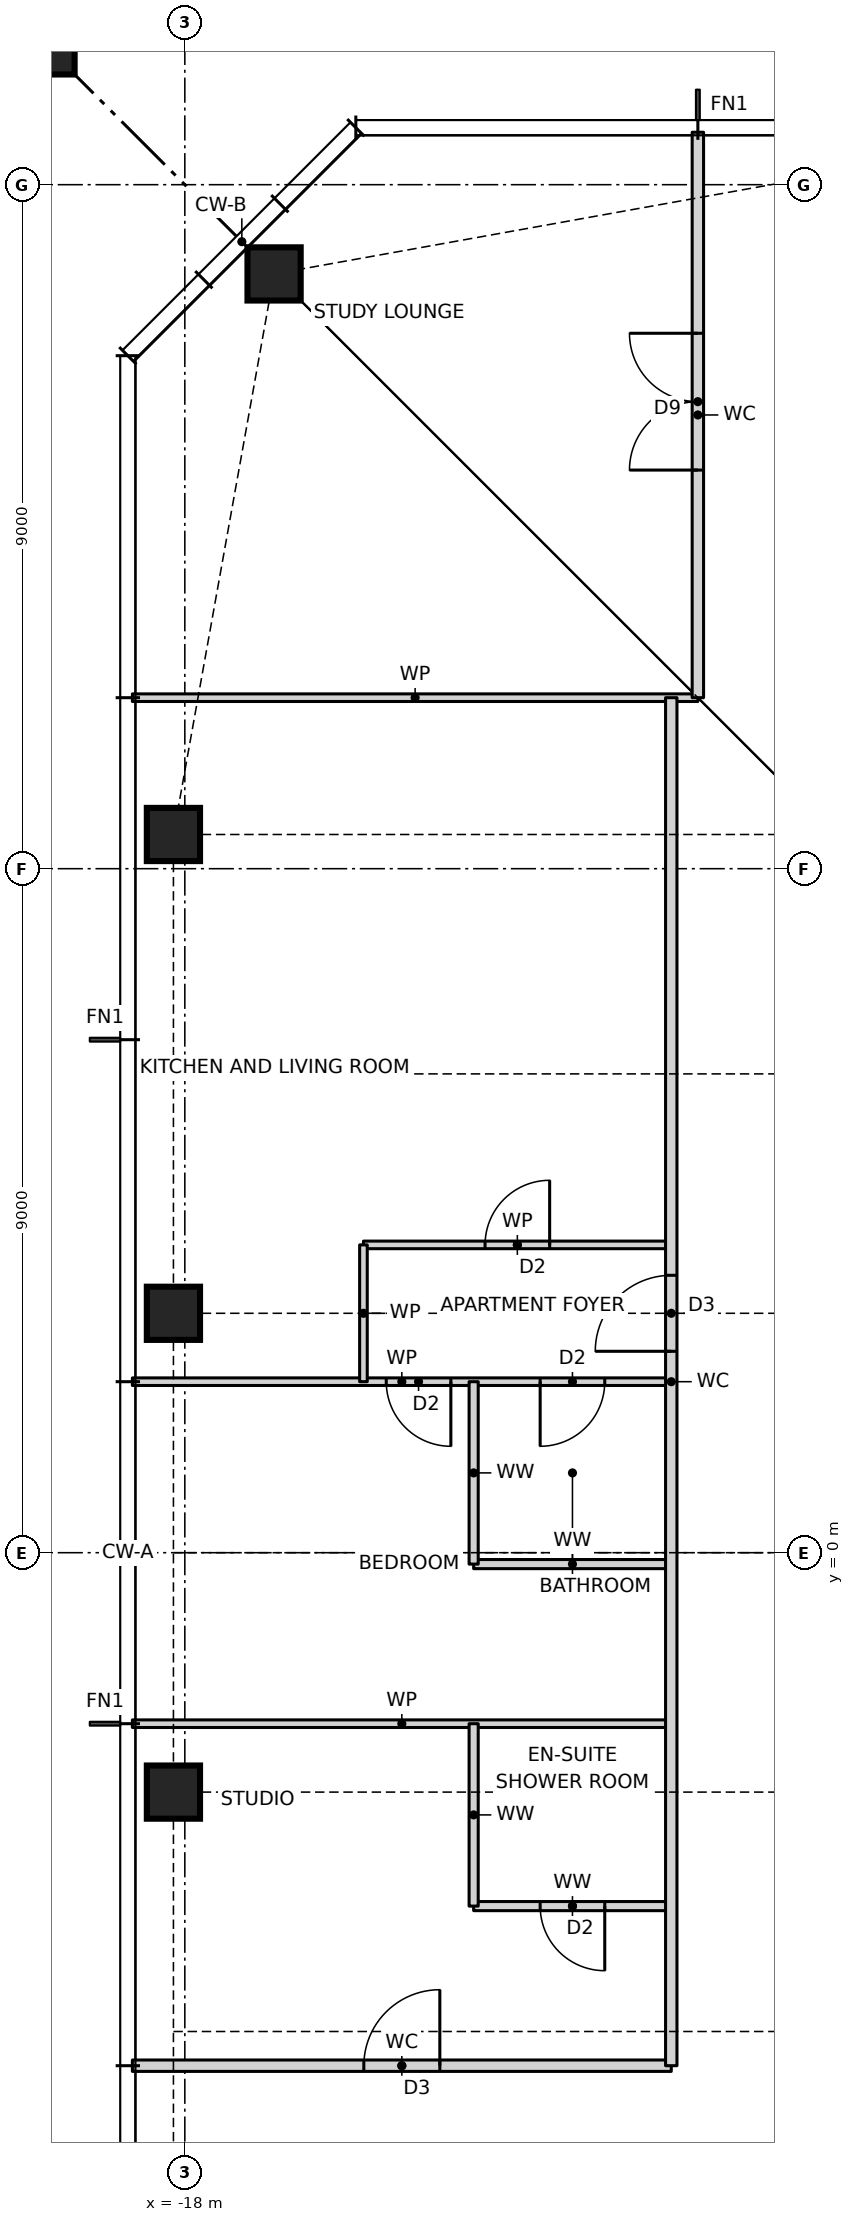
"""IFC4 building model, lengths in metres.
Left out: names, types, materials, properties, quantities, classifications, styles, units other than length and angle.
Written with IfcOpenShell. Run it as: python <this file> out.ifc"""

import sys

from ifc_helpers import new_model, si_unit, direction, frame, frame_2d, origin, origin_2d, place, context, subcontext, project, spatial, rectangle, hollow_rectangle, i_section, extrude, element, fill, save


model = new_model("IFC4")
c1 = context("Model", 3, precision=1e-05, world=origin(), true_north=direction((0.0, 1.0)))
c2 = subcontext(c1, "Body", "Model", "MODEL_VIEW")
j1 = project(units=[si_unit("LENGTHUNIT", "METRE"), si_unit("PLANEANGLEUNIT", "RADIAN")], contexts=[c1])
p1 = place(None, origin())
s1 = spatial("IfcSite", under=j1, at=p1, CompositionType="ELEMENT")
p2 = place(p1, origin())
s2 = spatial("IfcBuilding", under=s1, at=p2, CompositionType="ELEMENT")
p3 = place(p2, frame((0.0, 0.0, 170.5)))
s3 = spatial("IfcBuildingStorey", under=s2, at=p3, CompositionType="ELEMENT", Elevation=170.5)
for number, where, z_axis, x_axis in (
    (1, (-16.826, 16.826, 0.0), (0.0, 0.0, 1.0), (1.0, 0.0, 0.0)),
    (2, (-18.15, 9.45, 0.0), (0.0, 0.0, 1.0), (1.0, 0.0, 0.0)),
    (3, (-18.15, 3.15, 0.0), (0.0, 0.0, 1.0), (1.0, 0.0, 0.0)),
    (4, (-18.15, -3.15, 0.0), (0.0, 0.0, 1.0), (1.0, 0.0, 0.0)),
):
    element("IfcColumn", number, at=place(p3, frame(where, z_axis=z_axis, x_axis=x_axis)), inside=s3, PredefinedType="COLUMN", context=c2, shape_type="SweptSolid", body=[
        extrude(hollow_rectangle(XDim=0.7, YDim=0.7, WallThickness=0.06, at=origin_2d()), origin(), (0.0, 0.0, 1.0), 3.5),
    ])
p4 = place(p3, frame((-21.65, 21.65, 0.0), z_axis=(0.0, 0.0, 1.0), x_axis=(1.0, 0.0, 0.0)))
e5 = element("IfcColumn", 5, at=p4, inside=s3, PredefinedType="COLUMN", context=c2, shape_type="SweptSolid", body=[
    extrude(rectangle(XDim=4.4, YDim=4.4, at=origin_2d()), origin(), (0.0, 0.0, 1.0), 3.5),
    extrude(i_section(OverallWidth=0.478, OverallDepth=0.599, WebThickness=0.1, FlangeThickness=0.14, at=origin_2d()), origin(), (0.0, 0.0, 1.0), 3.5),
])
p5 = place(p3, frame((-18.69, -6.75, 0.0), z_axis=(0.0, 0.0, 1.0), x_axis=(1.0, 0.0, 0.0)))
e6 = element("IfcWall", 6, at=p5, inside=s3, PredefinedType="PARTITIONING", context=c2, shape_type="SweptSolid", body=[
    extrude(rectangle(XDim=7.09, YDim=0.15, at=frame_2d((3.545, 0.0))), origin(), (0.0, 0.0, 1.0), 3.27),
])
p6 = place(p5, frame((3.045, 0.0, 0.0)))
e7 = element("IfcOpeningElement", 7, at=p6, cuts=e6, PredefinedType="OPENING", context=c2, shape_type="SweptSolid", body=[
    extrude(rectangle(XDim=1.0, YDim=2.1, at=frame_2d((0.5, 1.05))), frame((0.0, 0.085, 0.0), z_axis=(0.0, -1.0, 0.0), x_axis=(1.0, 0.0, 0.0)), (0.0, 0.0, 1.0), 0.17),
])
p7 = place(p3, frame((-14.2, -4.65, 0.0), z_axis=(0.0, 0.0, 1.0), x_axis=(1.0, 0.0, 0.0)))
e8 = element("IfcWall", 8, at=p7, inside=s3, PredefinedType="PARTITIONING", context=c2, shape_type="SweptSolid", body=[
    extrude(rectangle(XDim=2.6, YDim=0.12, at=frame_2d((1.3, 0.0))), origin(), (0.0, 0.0, 1.0), 3.27),
])
p8 = place(p7, frame((0.875, 0.0, 0.0)))
e9 = element("IfcOpeningElement", 9, at=p8, cuts=e8, PredefinedType="OPENING", context=c2, shape_type="SweptSolid", body=[
    extrude(rectangle(XDim=0.85, YDim=2.1, at=frame_2d((0.425, 1.05))), frame((0.0, 0.07, 0.0), z_axis=(0.0, -1.0, 0.0), x_axis=(1.0, 0.0, 0.0)), (0.0, 0.0, 1.0), 0.14),
])
p9 = place(p3, frame((-18.69, -2.25, 0.0), z_axis=(0.0, 0.0, 1.0), x_axis=(1.0, 0.0, 0.0)))
e10 = element("IfcWall", 10, at=p9, inside=s3, PredefinedType="PARTITIONING", context=c2, shape_type="SweptSolid", body=[
    extrude(rectangle(XDim=7.09, YDim=0.1, at=frame_2d((3.545, 0.0))), origin(), (0.0, 0.0, 1.0), 3.27),
])
p10 = place(p3, frame((-14.2, -0.15, 0.0), z_axis=(0.0, 0.0, 1.0), x_axis=(1.0, 0.0, 0.0)))
e11 = element("IfcWall", 11, at=p10, inside=s3, PredefinedType="PARTITIONING", context=c2, shape_type="SweptSolid", body=[
    extrude(rectangle(XDim=2.6, YDim=0.12, at=frame_2d((1.3, 0.0))), origin(), (0.0, 0.0, 1.0), 3.27),
])
p11 = place(p3, frame((-18.69, 2.25, 0.0), z_axis=(0.0, 0.0, 1.0), x_axis=(1.0, 0.0, 0.0)))
e12 = element("IfcWall", 12, at=p11, inside=s3, PredefinedType="PARTITIONING", context=c2, shape_type="SweptSolid", body=[
    extrude(rectangle(XDim=7.09, YDim=0.1, at=frame_2d((3.545, 0.0))), origin(), (0.0, 0.0, 1.0), 3.27),
])
p12 = place(p11, frame((3.34, 0.0, 0.0)))
e13 = element("IfcOpeningElement", 13, at=p12, cuts=e12, PredefinedType="OPENING", context=c2, shape_type="SweptSolid", body=[
    extrude(rectangle(XDim=0.85, YDim=2.1, at=frame_2d((0.425, 1.05))), frame((0.0, 0.06, 0.0), z_axis=(0.0, -1.0, 0.0), x_axis=(1.0, 0.0, 0.0)), (0.0, 0.0, 1.0), 0.12),
])
p13 = place(p11, frame((5.365, 0.0, 0.0)))
e14 = element("IfcOpeningElement", 14, at=p13, cuts=e12, PredefinedType="OPENING", context=c2, shape_type="SweptSolid", body=[
    extrude(rectangle(XDim=0.85, YDim=2.1, at=frame_2d((0.425, 1.05))), frame((0.0, 0.06, 0.0), z_axis=(0.0, -1.0, 0.0), x_axis=(1.0, 0.0, 0.0)), (0.0, 0.0, 1.0), 0.12),
])
p14 = place(p3, frame((-15.65, 4.05, 0.0), z_axis=(0.0, 0.0, 1.0), x_axis=(1.0, 0.0, 0.0)))
e15 = element("IfcWall", 15, at=p14, inside=s3, PredefinedType="PARTITIONING", context=c2, shape_type="SweptSolid", body=[
    extrude(rectangle(XDim=4.05, YDim=0.1, at=frame_2d((2.025, 0.0))), origin(), (0.0, 0.0, 1.0), 3.27),
])
p15 = place(p14, frame((1.6, 0.0, 0.0)))
e16 = element("IfcOpeningElement", 16, at=p15, cuts=e15, PredefinedType="OPENING", context=c2, shape_type="SweptSolid", body=[
    extrude(rectangle(XDim=0.85, YDim=2.1, at=frame_2d((0.425, 1.05))), frame((0.0, 0.06, 0.0), z_axis=(0.0, -1.0, 0.0), x_axis=(1.0, 0.0, 0.0)), (0.0, 0.0, 1.0), 0.12),
])
p16 = place(p3, frame((-18.69, 11.25, 0.0), z_axis=(0.0, 0.0, 1.0), x_axis=(1.0, 0.0, 0.0)))
e17 = element("IfcWall", 17, at=p16, inside=s3, PredefinedType="PARTITIONING", context=c2, shape_type="SweptSolid", body=[
    extrude(rectangle(XDim=7.44, YDim=0.1, at=frame_2d((3.72, 0.0))), origin(), (0.0, 0.0, 1.0), 3.27),
])
p17 = place(p3, frame((-11.25, 11.25, 0.0), z_axis=(0.0, 0.0, 1.0), x_axis=(0.0, 1.0, 0.0)))
e18 = element("IfcWall", 18, at=p17, inside=s3, PredefinedType="PARTITIONING", context=c2, shape_type="SweptSolid", body=[
    extrude(rectangle(XDim=7.44, YDim=0.15, at=frame_2d((3.72, 0.0))), origin(), (0.0, 0.0, 1.0), 3.27),
])
p18 = place(p17, frame((2.995, 0.0, 0.0)))
e19 = element("IfcOpeningElement", 19, at=p18, cuts=e18, PredefinedType="OPENING", context=c2, shape_type="SweptSolid", body=[
    extrude(rectangle(XDim=1.8, YDim=2.1, at=frame_2d((0.9, 1.05))), frame((0.0, 0.085, 0.0), z_axis=(0.0, -1.0, 0.0), x_axis=(1.0, 0.0, 0.0)), (0.0, 0.0, 1.0), 0.17),
])
p19 = place(p3, frame((-11.6, -6.75, 0.0), z_axis=(0.0, 0.0, 1.0), x_axis=(0.0, 1.0, 0.0)))
e20 = element("IfcWall", 20, at=p19, inside=s3, PredefinedType="PARTITIONING", context=c2, shape_type="SweptSolid", body=[
    extrude(rectangle(XDim=18.0, YDim=0.15, at=frame_2d((9.0, 0.0))), origin(), (0.0, 0.0, 1.0), 3.27),
])
p20 = place(p19, frame((9.4, 0.0, 0.0)))
e21 = element("IfcOpeningElement", 21, at=p20, cuts=e20, PredefinedType="OPENING", context=c2, shape_type="SweptSolid", body=[
    extrude(rectangle(XDim=1.0, YDim=2.1, at=frame_2d((0.5, 1.05))), frame((0.0, 0.085, 0.0), z_axis=(0.0, -1.0, 0.0), x_axis=(1.0, 0.0, 0.0)), (0.0, 0.0, 1.0), 0.17),
])
for number, where, z_axis, x_axis in (
    (22, (-14.2, -4.65, 0.0), (0.0, 0.0, 1.0), (0.0, 1.0, 0.0)),
    (23, (-14.2, -0.15, 0.0), (0.0, 0.0, 1.0), (0.0, 1.0, 0.0)),
):
    element("IfcWall", number, at=place(p3, frame(where, z_axis=z_axis, x_axis=x_axis)), inside=s3, PredefinedType="PARTITIONING", context=c2, shape_type="SweptSolid", body=[
        extrude(rectangle(XDim=2.4, YDim=0.12, at=frame_2d((1.2, 0.0))), origin(), (0.0, 0.0, 1.0), 3.27),
    ])
p21 = place(p3, frame((-15.65, 2.25, 0.0), z_axis=(0.0, 0.0, 1.0), x_axis=(0.0, 1.0, 0.0)))
e24 = element("IfcWall", 24, at=p21, inside=s3, PredefinedType="PARTITIONING", context=c2, shape_type="SweptSolid", body=[
    extrude(rectangle(XDim=1.8, YDim=0.1, at=frame_2d((0.9, 0.0))), origin(), (0.0, 0.0, 1.0), 3.27),
])
p22 = place(p20, origin())
e25 = element("IfcDoor", 25, at=p22, inside=s3, OperationType="SINGLE_SWING_LEFT", PredefinedType="DOOR", context=c2, shape_type="SweptSolid", body=[
    extrude(rectangle(XDim=1.0, YDim=2.1, at=frame_2d((0.5, 1.05))), frame((0.0, 0.025, 0.0), z_axis=(0.0, -1.0, 0.0), x_axis=(1.0, 0.0, 0.0)), (0.0, 0.0, 1.0), 0.05),
])
fill(e21, e25)
p23 = place(p15, origin())
e26 = element("IfcDoor", 26, at=p23, inside=s3, OperationType="SINGLE_SWING_RIGHT", PredefinedType="DOOR", context=c2, shape_type="SweptSolid", body=[
    extrude(rectangle(XDim=0.85, YDim=2.1, at=frame_2d((0.425, 1.05))), frame((0.0, 0.025, 0.0), z_axis=(0.0, -1.0, 0.0), x_axis=(1.0, 0.0, 0.0)), (0.0, 0.0, 1.0), 0.05),
])
fill(e16, e26)
p24 = place(p12, frame((0.85, 0.0, 0.0), z_axis=(0.0, 0.0, 1.0), x_axis=(-1.0, 0.0, 0.0)))
e27 = element("IfcDoor", 27, at=p24, inside=s3, OperationType="SINGLE_SWING_LEFT", PredefinedType="DOOR", context=c2, shape_type="SweptSolid", body=[
    extrude(rectangle(XDim=0.85, YDim=2.1, at=frame_2d((0.425, 1.05))), frame((0.0, 0.025, 0.0), z_axis=(0.0, -1.0, 0.0), x_axis=(1.0, 0.0, 0.0)), (0.0, 0.0, 1.0), 0.05),
])
fill(e13, e27)
p25 = place(p13, frame((0.85, 0.0, 0.0), z_axis=(0.0, 0.0, 1.0), x_axis=(-1.0, 0.0, 0.0)))
e28 = element("IfcDoor", 28, at=p25, inside=s3, OperationType="SINGLE_SWING_RIGHT", PredefinedType="DOOR", context=c2, shape_type="SweptSolid", body=[
    extrude(rectangle(XDim=0.85, YDim=2.1, at=frame_2d((0.425, 1.05))), frame((0.0, 0.025, 0.0), z_axis=(0.0, -1.0, 0.0), x_axis=(1.0, 0.0, 0.0)), (0.0, 0.0, 1.0), 0.05),
])
fill(e14, e28)
p26 = place(p6, origin())
e29 = element("IfcDoor", 29, at=p26, inside=s3, OperationType="SINGLE_SWING_RIGHT", PredefinedType="DOOR", context=c2, shape_type="SweptSolid", body=[
    extrude(rectangle(XDim=1.0, YDim=2.1, at=frame_2d((0.5, 1.05))), frame((0.0, 0.025, 0.0), z_axis=(0.0, -1.0, 0.0), x_axis=(1.0, 0.0, 0.0)), (0.0, 0.0, 1.0), 0.05),
])
fill(e7, e29)
p27 = place(p8, frame((0.85, 0.0, 0.0), z_axis=(0.0, 0.0, 1.0), x_axis=(-1.0, 0.0, 0.0)))
e30 = element("IfcDoor", 30, at=p27, inside=s3, OperationType="SINGLE_SWING_LEFT", PredefinedType="DOOR", context=c2, shape_type="SweptSolid", body=[
    extrude(rectangle(XDim=0.85, YDim=2.1, at=frame_2d((0.425, 1.05))), frame((0.0, 0.025, 0.0), z_axis=(0.0, -1.0, 0.0), x_axis=(1.0, 0.0, 0.0)), (0.0, 0.0, 1.0), 0.05),
])
fill(e9, e30)
p28 = place(p18, origin())
e31 = element("IfcDoor", 31, at=p28, inside=s3, OperationType="DOUBLE_DOOR_SINGLE_SWING", PredefinedType="DOOR", context=c2, shape_type="SweptSolid", body=[
    extrude(rectangle(XDim=1.8, YDim=2.1, at=frame_2d((0.9, 1.05))), frame((0.0, 0.025, 0.0), z_axis=(0.0, -1.0, 0.0), x_axis=(1.0, 0.0, 0.0)), (0.0, 0.0, 1.0), 0.05),
])
fill(e19, e31)
save(model, sys.argv[1])
